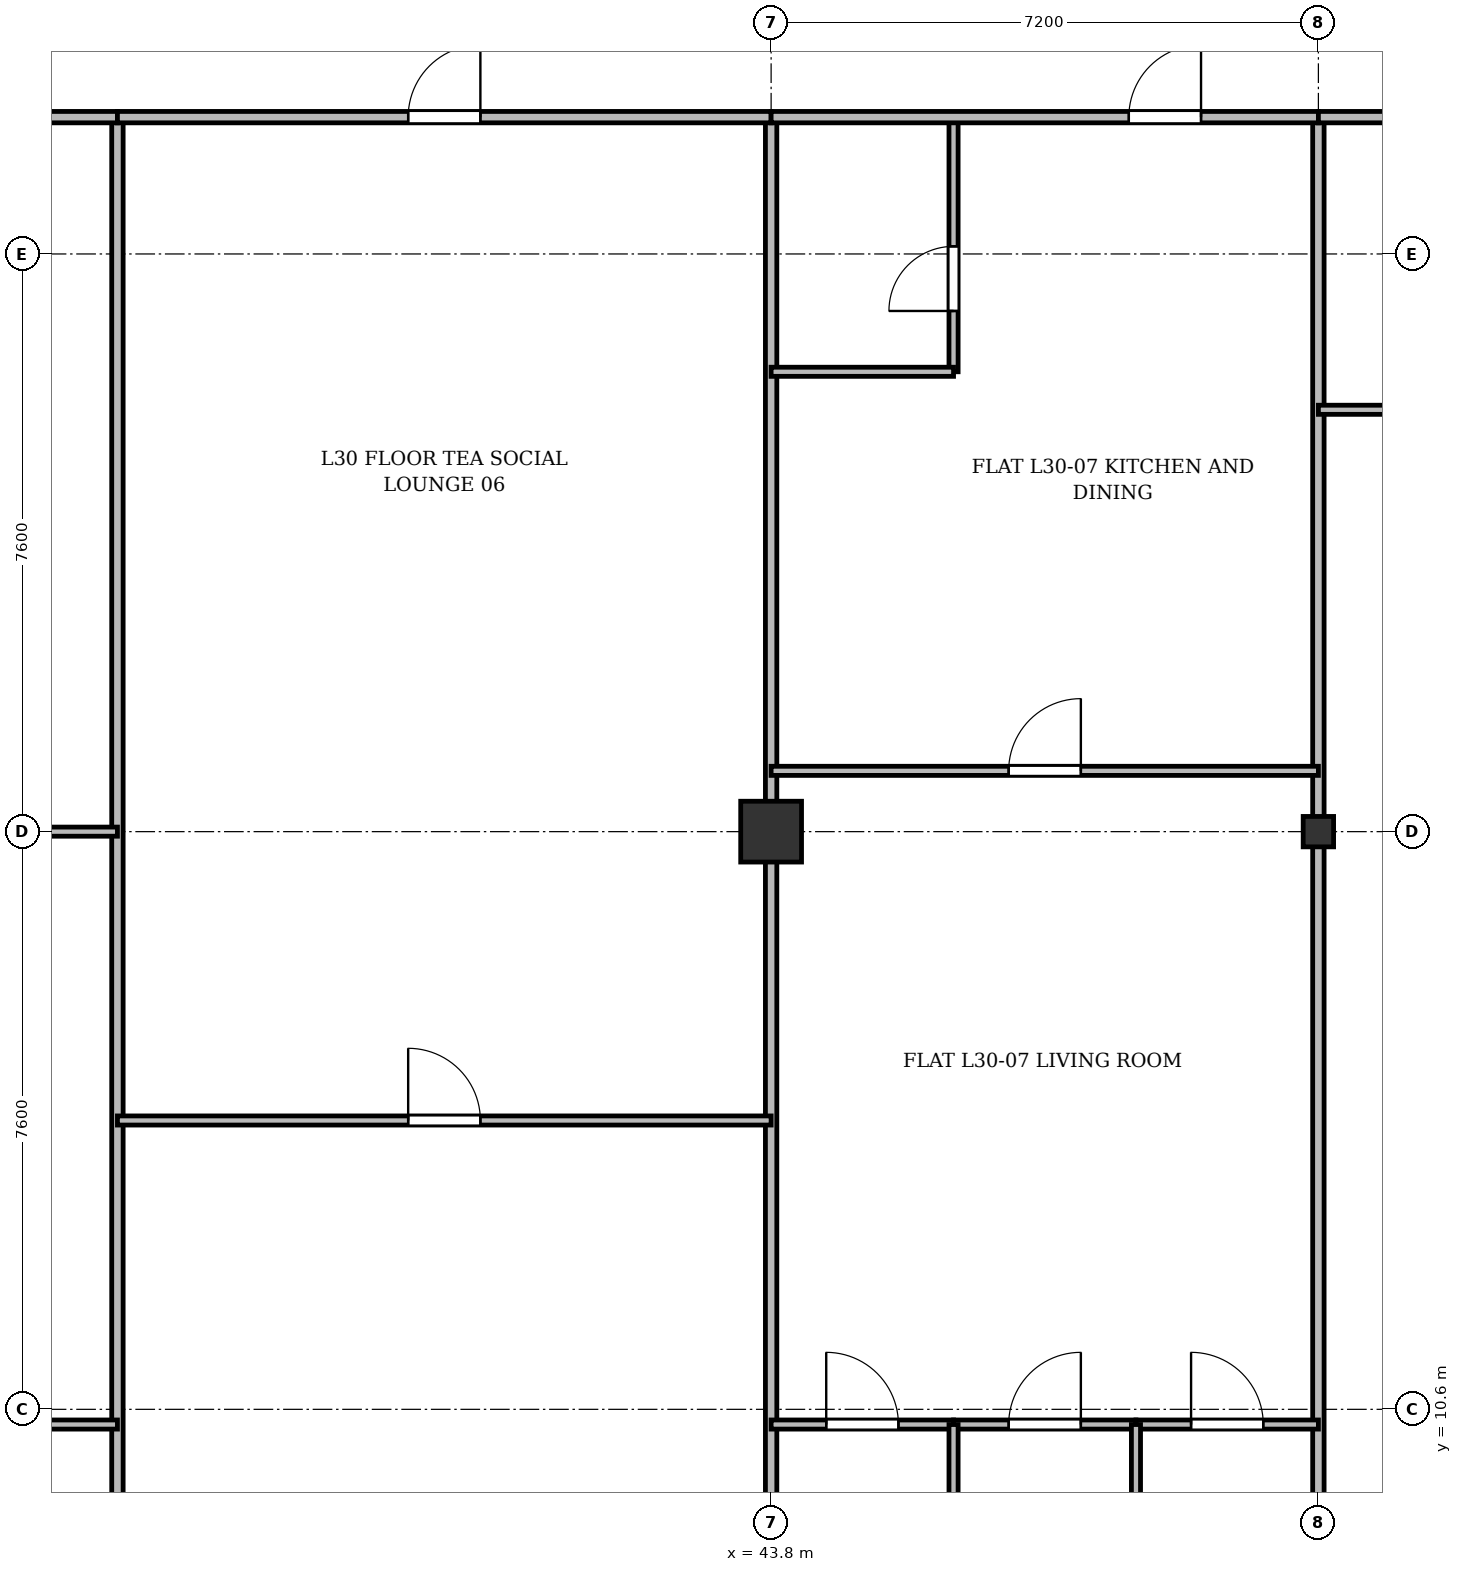
"""IFC4 building model, lengths in metres.
Left out: names, types, materials, properties, quantities, classifications, styles, units other than length and angle.
Written with IfcOpenShell. Run it as: python <this file> out.ifc"""

import sys

from ifc_helpers import new_model, si_unit, direction, frame, frame_2d, origin, origin_2d, place, context, subcontext, project, spatial, rectangle, i_section, extrude, source, transform, mapped, element, fill, save


model = new_model("IFC4")
c1 = context("Model", 3, precision=1e-05, world=origin(), true_north=direction((0.0, 1.0)))
c2 = subcontext(c1, "Body", "Model", "MODEL_VIEW")
j1 = project(units=[si_unit("LENGTHUNIT", "METRE"), si_unit("PLANEANGLEUNIT", "RADIAN")], contexts=[c1])
p1 = place(None, origin())
s1 = spatial("IfcSite", under=j1, at=p1, CompositionType="ELEMENT")
p2 = place(p1, origin())
s2 = spatial("IfcBuilding", under=s1, at=p2, CompositionType="ELEMENT")
p3 = place(p2, frame((0.0, 0.0, 117.7)))
s3 = spatial("IfcBuildingStorey", under=s2, at=p3, CompositionType="ELEMENT", Elevation=117.7)
m1 = source(origin(), c2, "Body", "SweptSolid", [
    extrude(rectangle(XDim=0.8, YDim=0.8, at=origin_2d()), origin(), (0.0, 0.0, 1.0), 3.6),
])
p4 = place(p3, frame((43.8, 18.2, 0.0), z_axis=(0.0, 0.0, 1.0), x_axis=(1.0, 0.0, 0.0)))
e1 = element("IfcColumn", 1, at=p4, inside=s3, PredefinedType="COLUMN", context=c2, shape_type="MappedRepresentation", body=[
    mapped(m1, transform((0.0, 0.0, 0.0), x_axis=(1.0, 0.0, 0.0), y_axis=(0.0, 1.0, 0.0), z_axis=(0.0, 0.0, 1.0), scale=1.0)),
])
m2 = source(origin(), c2, "Body", "SweptSolid", [
    extrude(i_section(OverallWidth=0.4, OverallDepth=0.4, WebThickness=0.022, FlangeThickness=0.035, at=origin_2d()), origin(), (0.0, 0.0, 1.0), 3.6),
])
p5 = place(p3, frame((51.0, 18.2, 0.0), z_axis=(0.0, 0.0, 1.0), x_axis=(1.0, 0.0, 0.0)))
e2 = element("IfcColumn", 2, at=p5, inside=s3, PredefinedType="COLUMN", context=c2, shape_type="MappedRepresentation", body=[
    mapped(m2, transform((0.0, 0.0, 0.0), x_axis=(1.0, 0.0, 0.0), y_axis=(0.0, 1.0, 0.0), z_axis=(0.0, 0.0, 1.0), scale=1.0)),
])
p6 = place(p3, frame((35.2, 3.145, 0.0), z_axis=(0.0, 0.0, 1.0), x_axis=(0.0, 1.0, 0.0)))
e3 = element("IfcWall", 3, at=p6, inside=s3, PredefinedType="PARTITIONING", context=c2, shape_type="SweptSolid", body=[
    extrude(rectangle(XDim=24.455, YDim=0.15, at=frame_2d((12.228, 0.0))), origin(), (0.0, 0.0, 1.0), 2.752),
])
for number, where, z_axis, x_axis in (
    (4, (43.8, 3.145, 0.0), (0.0, 0.0, 1.0), (0.0, 1.0, 0.0)),
    (5, (51.0, 3.145, 0.0), (0.0, 0.0, 1.0), (0.0, 1.0, 0.0)),
):
    element("IfcWall", number, at=place(p3, frame(where, z_axis=z_axis, x_axis=x_axis)), inside=s3, PredefinedType="PARTITIONING", context=c2, shape_type="SweptSolid", body=[
        extrude(rectangle(XDim=24.455, YDim=0.15, at=frame_2d((12.228, 0.0))), origin(), (0.0, 0.0, 1.0), 2.84),
    ])
p7 = place(p3, frame((27.8, 18.2, 0.0), z_axis=(0.0, 0.0, 1.0), x_axis=(1.0, 0.0, 0.0)))
e6 = element("IfcWall", 6, at=p7, inside=s3, PredefinedType="PARTITIONING", context=c2, shape_type="SweptSolid", body=[
    extrude(rectangle(XDim=7.4, YDim=0.12, at=frame_2d((3.7, 0.0))), origin(), (0.0, 0.0, 1.0), 2.752),
])
p8 = place(p7, frame((4.051, 0.0, 0.0)))
e7 = element("IfcOpeningElement", 7, at=p8, cuts=e6, PredefinedType="OPENING", context=c2, shape_type="SweptSolid", body=[
    extrude(rectangle(XDim=0.95, YDim=2.15, at=frame_2d((0.475, 1.075))), frame((0.0, 0.07, 0.0), z_axis=(0.0, -1.0, 0.0), x_axis=(1.0, 0.0, 0.0)), (0.0, 0.0, 1.0), 0.14),
])
p9 = place(p3, frame((27.8, 27.6, 0.0), z_axis=(0.0, 0.0, 1.0), x_axis=(1.0, 0.0, 0.0)))
e8 = element("IfcWall", 8, at=p9, inside=s3, PredefinedType="PARTITIONING", context=c2, shape_type="SweptSolid", body=[
    extrude(rectangle(XDim=7.4, YDim=0.15, at=frame_2d((3.7, 0.0))), origin(), (0.0, 0.0, 1.0), 2.84),
])
p10 = place(p9, frame((4.967, 0.0, 0.0)))
e9 = element("IfcOpeningElement", 9, at=p10, cuts=e8, PredefinedType="OPENING", context=c2, shape_type="SweptSolid", body=[
    extrude(rectangle(XDim=0.95, YDim=2.15, at=frame_2d((0.475, 1.075))), frame((0.0, 0.085, 0.0), z_axis=(0.0, -1.0, 0.0), x_axis=(1.0, 0.0, 0.0)), (0.0, 0.0, 1.0), 0.17),
])
p11 = place(p3, frame((31.5, 10.4, 0.0), z_axis=(0.0, 0.0, 1.0), x_axis=(1.0, 0.0, 0.0)))
e10 = element("IfcWall", 10, at=p11, inside=s3, PredefinedType="PARTITIONING", context=c2, shape_type="SweptSolid", body=[
    extrude(rectangle(XDim=3.7, YDim=0.12, at=frame_2d((1.85, 0.0))), origin(), (0.0, 0.0, 1.0), 3.34),
])
p12 = place(p11, frame((1.285, 0.0, 0.0)))
e11 = element("IfcOpeningElement", 11, at=p12, cuts=e10, PredefinedType="OPENING", context=c2, shape_type="SweptSolid", body=[
    extrude(rectangle(XDim=0.95, YDim=2.15, at=frame_2d((0.475, 1.075))), frame((0.0, 0.07, 0.0), z_axis=(0.0, -1.0, 0.0), x_axis=(1.0, 0.0, 0.0)), (0.0, 0.0, 1.0), 0.14),
])
p13 = place(p3, frame((35.2, 27.6, 0.0), z_axis=(0.0, 0.0, 1.0), x_axis=(1.0, 0.0, 0.0)))
e12 = element("IfcWall", 12, at=p13, inside=s3, PredefinedType="PARTITIONING", context=c2, shape_type="SweptSolid", body=[
    extrude(rectangle(XDim=8.6, YDim=0.15, at=frame_2d((4.3, 0.0))), origin(), (0.0, 0.0, 1.0), 2.84),
])
p14 = place(p13, frame((3.825, 0.0, 0.0)))
e13 = element("IfcOpeningElement", 13, at=p14, cuts=e12, PredefinedType="OPENING", context=c2, shape_type="SweptSolid", body=[
    extrude(rectangle(XDim=0.95, YDim=2.15, at=frame_2d((0.475, 1.075))), frame((0.0, 0.085, 0.0), z_axis=(0.0, -1.0, 0.0), x_axis=(1.0, 0.0, 0.0)), (0.0, 0.0, 1.0), 0.17),
])
p15 = place(p3, frame((35.2, 14.4, 0.0), z_axis=(0.0, 0.0, 1.0), x_axis=(1.0, 0.0, 0.0)))
e14 = element("IfcWall", 14, at=p15, inside=s3, PredefinedType="PARTITIONING", context=c2, shape_type="SweptSolid", body=[
    extrude(rectangle(XDim=8.6, YDim=0.12, at=frame_2d((4.3, 0.0))), origin(), (0.0, 0.0, 1.0), 2.84),
])
p16 = place(p15, frame((3.825, 0.0, 0.0)))
e15 = element("IfcOpeningElement", 15, at=p16, cuts=e14, PredefinedType="OPENING", context=c2, shape_type="SweptSolid", body=[
    extrude(rectangle(XDim=0.95, YDim=2.15, at=frame_2d((0.475, 1.075))), frame((0.0, 0.07, 0.0), z_axis=(0.0, -1.0, 0.0), x_axis=(1.0, 0.0, 0.0)), (0.0, 0.0, 1.0), 0.14),
])
p17 = place(p3, frame((43.8, 19.0, 0.0), z_axis=(0.0, 0.0, 1.0), x_axis=(1.0, 0.0, 0.0)))
e16 = element("IfcWall", 16, at=p17, inside=s3, PredefinedType="PARTITIONING", context=c2, shape_type="SweptSolid", body=[
    extrude(rectangle(XDim=7.2, YDim=0.12, at=frame_2d((3.6, 0.0))), origin(), (0.0, 0.0, 1.0), 2.84),
])
p18 = place(p17, frame((3.125, 0.0, 0.0)))
e17 = element("IfcOpeningElement", 17, at=p18, cuts=e16, PredefinedType="OPENING", context=c2, shape_type="SweptSolid", body=[
    extrude(rectangle(XDim=0.95, YDim=2.15, at=frame_2d((0.475, 1.075))), frame((0.0, 0.07, 0.0), z_axis=(0.0, -1.0, 0.0), x_axis=(1.0, 0.0, 0.0)), (0.0, 0.0, 1.0), 0.14),
])
p19 = place(p3, frame((46.2, 24.25, 0.0), z_axis=(0.0, 0.0, 1.0), x_axis=(0.0, 1.0, 0.0)))
e18 = element("IfcWall", 18, at=p19, inside=s3, PredefinedType="PARTITIONING", context=c2, shape_type="SweptSolid", body=[
    extrude(rectangle(XDim=3.35, YDim=0.12, at=frame_2d((1.675, 0.0))), origin(), (0.0, 0.0, 1.0), 2.99),
])
p20 = place(p19, frame((0.8, 0.0, 0.0)))
e19 = element("IfcOpeningElement", 19, at=p20, cuts=e18, PredefinedType="OPENING", context=c2, shape_type="SweptSolid", body=[
    extrude(rectangle(XDim=0.85, YDim=2.1, at=frame_2d((0.425, 1.05))), frame((0.0, 0.07, 0.0), z_axis=(0.0, -1.0, 0.0), x_axis=(1.0, 0.0, 0.0)), (0.0, 0.0, 1.0), 0.14),
])
p21 = place(p3, frame((43.8, 24.25, 0.0), z_axis=(0.0, 0.0, 1.0), x_axis=(1.0, 0.0, 0.0)))
e20 = element("IfcWall", 20, at=p21, inside=s3, PredefinedType="PARTITIONING", context=c2, shape_type="SweptSolid", body=[
    extrude(rectangle(XDim=2.4, YDim=0.12, at=frame_2d((1.2, 0.0))), origin(), (0.0, 0.0, 1.0), 2.84),
])
p22 = place(p3, frame((43.8, 27.6, 0.0), z_axis=(0.0, 0.0, 1.0), x_axis=(1.0, 0.0, 0.0)))
e21 = element("IfcWall", 21, at=p22, inside=s3, PredefinedType="PARTITIONING", context=c2, shape_type="SweptSolid", body=[
    extrude(rectangle(XDim=7.2, YDim=0.15, at=frame_2d((3.6, 0.0))), origin(), (0.0, 0.0, 1.0), 2.84),
])
p23 = place(p22, frame((4.706, 0.0, 0.0)))
e22 = element("IfcOpeningElement", 22, at=p23, cuts=e21, PredefinedType="OPENING", context=c2, shape_type="SweptSolid", body=[
    extrude(rectangle(XDim=0.95, YDim=2.15, at=frame_2d((0.475, 1.075))), frame((0.0, 0.085, 0.0), z_axis=(0.0, -1.0, 0.0), x_axis=(1.0, 0.0, 0.0)), (0.0, 0.0, 1.0), 0.17),
])
p24 = place(p3, frame((43.8, 10.4, 0.0), z_axis=(0.0, 0.0, 1.0), x_axis=(1.0, 0.0, 0.0)))
e23 = element("IfcWall", 23, at=p24, inside=s3, PredefinedType="PARTITIONING", context=c2, shape_type="SweptSolid", body=[
    extrude(rectangle(XDim=2.4, YDim=0.12, at=frame_2d((1.2, 0.0))), origin(), (0.0, 0.0, 1.0), 2.84),
])
p25 = place(p24, frame((0.725, 0.0, 0.0)))
e24 = element("IfcOpeningElement", 24, at=p25, cuts=e23, PredefinedType="OPENING", context=c2, shape_type="SweptSolid", body=[
    extrude(rectangle(XDim=0.95, YDim=2.15, at=frame_2d((0.475, 1.075))), frame((0.0, 0.07, 0.0), z_axis=(0.0, -1.0, 0.0), x_axis=(1.0, 0.0, 0.0)), (0.0, 0.0, 1.0), 0.14),
])
p26 = place(p3, frame((46.2, 10.4, 0.0), z_axis=(0.0, 0.0, 1.0), x_axis=(1.0, 0.0, 0.0)))
e25 = element("IfcWall", 25, at=p26, inside=s3, PredefinedType="PARTITIONING", context=c2, shape_type="SweptSolid", body=[
    extrude(rectangle(XDim=2.4, YDim=0.12, at=frame_2d((1.2, 0.0))), origin(), (0.0, 0.0, 1.0), 3.34),
])
p27 = place(p26, frame((0.725, 0.0, 0.0)))
e26 = element("IfcOpeningElement", 26, at=p27, cuts=e25, PredefinedType="OPENING", context=c2, shape_type="SweptSolid", body=[
    extrude(rectangle(XDim=0.95, YDim=2.15, at=frame_2d((0.475, 1.075))), frame((0.0, 0.07, 0.0), z_axis=(0.0, -1.0, 0.0), x_axis=(1.0, 0.0, 0.0)), (0.0, 0.0, 1.0), 0.14),
])
p28 = place(p3, frame((46.2, 3.145, 0.0), z_axis=(0.0, 0.0, 1.0), x_axis=(0.0, 1.0, 0.0)))
e27 = element("IfcWall", 27, at=p28, inside=s3, PredefinedType="PARTITIONING", context=c2, shape_type="SweptSolid", body=[
    extrude(rectangle(XDim=7.255, YDim=0.12, at=frame_2d((3.627, 0.0))), origin(), (0.0, 0.0, 1.0), 2.752),
])
p29 = place(p3, frame((48.6, 10.4, 0.0), z_axis=(0.0, 0.0, 1.0), x_axis=(1.0, 0.0, 0.0)))
e28 = element("IfcWall", 28, at=p29, inside=s3, PredefinedType="PARTITIONING", context=c2, shape_type="SweptSolid", body=[
    extrude(rectangle(XDim=2.4, YDim=0.12, at=frame_2d((1.2, 0.0))), origin(), (0.0, 0.0, 1.0), 2.84),
])
p30 = place(p29, frame((0.725, 0.0, 0.0)))
e29 = element("IfcOpeningElement", 29, at=p30, cuts=e28, PredefinedType="OPENING", context=c2, shape_type="SweptSolid", body=[
    extrude(rectangle(XDim=0.95, YDim=2.15, at=frame_2d((0.475, 1.075))), frame((0.0, 0.07, 0.0), z_axis=(0.0, -1.0, 0.0), x_axis=(1.0, 0.0, 0.0)), (0.0, 0.0, 1.0), 0.14),
])
p31 = place(p3, frame((48.6, 3.145, 0.0), z_axis=(0.0, 0.0, 1.0), x_axis=(0.0, 1.0, 0.0)))
e30 = element("IfcWall", 30, at=p31, inside=s3, PredefinedType="PARTITIONING", context=c2, shape_type="SweptSolid", body=[
    extrude(rectangle(XDim=7.255, YDim=0.12, at=frame_2d((3.627, 0.0))), origin(), (0.0, 0.0, 1.0), 2.752),
])
p32 = place(p3, frame((51.0, 27.6, 0.0), z_axis=(0.0, 0.0, 1.0), x_axis=(1.0, 0.0, 0.0)))
e31 = element("IfcWall", 31, at=p32, inside=s3, PredefinedType="PARTITIONING", context=c2, shape_type="SweptSolid", body=[
    extrude(rectangle(XDim=7.8, YDim=0.15, at=frame_2d((3.9, 0.0))), origin(), (0.0, 0.0, 1.0), 2.84),
])
p33 = place(p32, frame((3.333, 0.0, 0.0)))
e32 = element("IfcOpeningElement", 32, at=p33, cuts=e31, PredefinedType="OPENING", context=c2, shape_type="SweptSolid", body=[
    extrude(rectangle(XDim=0.95, YDim=2.15, at=frame_2d((0.475, 1.075))), frame((0.0, 0.085, 0.0), z_axis=(0.0, -1.0, 0.0), x_axis=(1.0, 0.0, 0.0)), (0.0, 0.0, 1.0), 0.17),
])
p34 = place(p3, frame((51.0, 23.75, 0.0), z_axis=(0.0, 0.0, 1.0), x_axis=(1.0, 0.0, 0.0)))
e33 = element("IfcWall", 33, at=p34, inside=s3, PredefinedType="PARTITIONING", context=c2, shape_type="SweptSolid", body=[
    extrude(rectangle(XDim=7.8, YDim=0.12, at=frame_2d((3.9, 0.0))), origin(), (0.0, 0.0, 1.0), 2.84),
])
p35 = place(p34, frame((3.333, 0.0, 0.0)))
e34 = element("IfcOpeningElement", 34, at=p35, cuts=e33, PredefinedType="OPENING", context=c2, shape_type="SweptSolid", body=[
    extrude(rectangle(XDim=0.95, YDim=2.15, at=frame_2d((0.475, 1.075))), frame((0.0, 0.07, 0.0), z_axis=(0.0, -1.0, 0.0), x_axis=(1.0, 0.0, 0.0)), (0.0, 0.0, 1.0), 0.14),
])
m3 = source(origin(), c2, "Body", "SweptSolid", [
    extrude(rectangle(XDim=0.95, YDim=2.15, at=frame_2d((0.475, 1.075))), frame((0.0, 0.025, 0.0), z_axis=(0.0, -1.0, 0.0), x_axis=(1.0, 0.0, 0.0)), (0.0, 0.0, 1.0), 0.05),
])
p36 = place(p14, origin())
e35 = element("IfcDoor", 35, at=p36, inside=s3, OperationType="SINGLE_SWING_RIGHT", PredefinedType="DOOR", context=c2, shape_type="MappedRepresentation", body=[
    mapped(m3, transform((0.0, 0.0, 0.0), x_axis=(1.0, 0.0, 0.0), y_axis=(0.0, 1.0, 0.0), z_axis=(0.0, 0.0, 1.0), scale=1.0)),
])
fill(e13, e35)
p37 = place(p16, origin())
e36 = element("IfcDoor", 36, at=p37, inside=s3, OperationType="SINGLE_SWING_LEFT", PredefinedType="DOOR", context=c2, shape_type="MappedRepresentation", body=[
    mapped(m3, transform((0.0, 0.0, 0.0), x_axis=(1.0, 0.0, 0.0), y_axis=(0.0, 1.0, 0.0), z_axis=(0.0, 0.0, 1.0), scale=1.0)),
])
fill(e15, e36)
p38 = place(p18, origin())
e37 = element("IfcDoor", 37, at=p38, inside=s3, OperationType="SINGLE_SWING_RIGHT", PredefinedType="DOOR", context=c2, shape_type="MappedRepresentation", body=[
    mapped(m3, transform((0.0, 0.0, 0.0), x_axis=(1.0, 0.0, 0.0), y_axis=(0.0, 1.0, 0.0), z_axis=(0.0, 0.0, 1.0), scale=1.0)),
])
fill(e17, e37)
m4 = source(origin(), c2, "Body", "SweptSolid", [
    extrude(rectangle(XDim=0.85, YDim=2.1, at=frame_2d((0.425, 1.05))), frame((0.0, 0.025, 0.0), z_axis=(0.0, -1.0, 0.0), x_axis=(1.0, 0.0, 0.0)), (0.0, 0.0, 1.0), 0.05),
])
p39 = place(p20, origin())
e38 = element("IfcDoor", 38, at=p39, inside=s3, OperationType="SINGLE_SWING_LEFT", PredefinedType="DOOR", context=c2, shape_type="MappedRepresentation", body=[
    mapped(m4, transform((0.0, 0.0, 0.0), x_axis=(1.0, 0.0, 0.0), y_axis=(0.0, 1.0, 0.0), z_axis=(0.0, 0.0, 1.0), scale=1.0)),
])
fill(e19, e38)
p40 = place(p23, origin())
e39 = element("IfcDoor", 39, at=p40, inside=s3, OperationType="SINGLE_SWING_RIGHT", PredefinedType="DOOR", context=c2, shape_type="MappedRepresentation", body=[
    mapped(m3, transform((0.0, 0.0, 0.0), x_axis=(1.0, 0.0, 0.0), y_axis=(0.0, 1.0, 0.0), z_axis=(0.0, 0.0, 1.0), scale=1.0)),
])
fill(e22, e39)
p41 = place(p25, origin())
e40 = element("IfcDoor", 40, at=p41, inside=s3, OperationType="SINGLE_SWING_LEFT", PredefinedType="DOOR", context=c2, shape_type="MappedRepresentation", body=[
    mapped(m3, transform((0.0, 0.0, 0.0), x_axis=(1.0, 0.0, 0.0), y_axis=(0.0, 1.0, 0.0), z_axis=(0.0, 0.0, 1.0), scale=1.0)),
])
fill(e24, e40)
p42 = place(p27, origin())
e41 = element("IfcDoor", 41, at=p42, inside=s3, OperationType="SINGLE_SWING_RIGHT", PredefinedType="DOOR", context=c2, shape_type="MappedRepresentation", body=[
    mapped(m3, transform((0.0, 0.0, 0.0), x_axis=(1.0, 0.0, 0.0), y_axis=(0.0, 1.0, 0.0), z_axis=(0.0, 0.0, 1.0), scale=1.0)),
])
fill(e26, e41)
p43 = place(p30, origin())
e42 = element("IfcDoor", 42, at=p43, inside=s3, OperationType="SINGLE_SWING_LEFT", PredefinedType="DOOR", context=c2, shape_type="MappedRepresentation", body=[
    mapped(m3, transform((0.0, 0.0, 0.0), x_axis=(1.0, 0.0, 0.0), y_axis=(0.0, 1.0, 0.0), z_axis=(0.0, 0.0, 1.0), scale=1.0)),
])
fill(e29, e42)
save(model, sys.argv[1])
